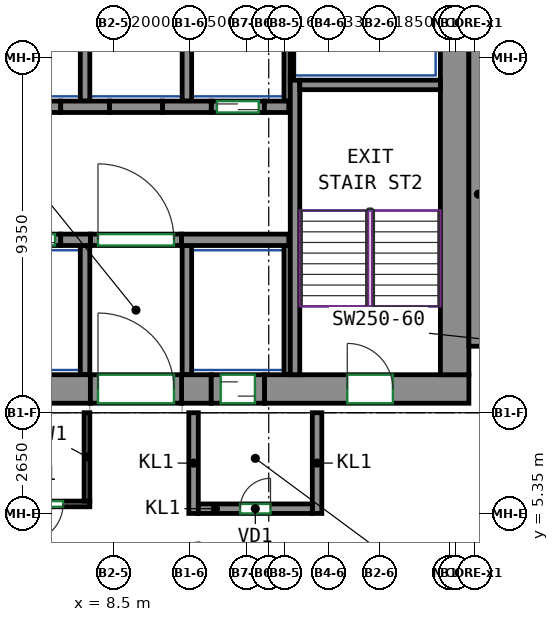
"""IFC4 building model, lengths in metres.
Left out: names, types, materials, properties, quantities, classifications, styles, units other than length and angle.
Written with IfcOpenShell. Run it as: python <this file> out.ifc"""

import sys

from ifc_helpers import new_model, si_unit, direction, frame, frame_2d, origin, place, context, subcontext, project, spatial, rectangle, extrude, source, transform, mapped, element, fill, save


model = new_model("IFC4")
c1 = context("Model", 3, precision=1e-05, world=origin(), true_north=direction((0.0, 1.0)))
c2 = subcontext(c1, "Body", "Model", "MODEL_VIEW")
j1 = project(units=[si_unit("LENGTHUNIT", "METRE"), si_unit("PLANEANGLEUNIT", "RADIAN")], contexts=[c1])
p1 = place(None, origin())
s1 = spatial("IfcSite", under=j1, at=p1, CompositionType="ELEMENT")
p2 = place(p1, origin())
s2 = spatial("IfcBuilding", under=s1, at=p2, CompositionType="ELEMENT")
p3 = place(p2, frame((0.0, 0.0, 210.1)))
s3 = spatial("IfcBuildingStorey", under=s2, at=p3, CompositionType="ELEMENT", Elevation=210.1)
m1 = source(origin(), c2, "Body", "SweptSolid", [
    extrude(rectangle(XDim=14.18, YDim=0.75, at=frame_2d((7.09, 0.0))), origin(), (0.0, 0.0, 1.0), 3.12),
])
p4 = place(p3, frame((-6.29, 8.625, 0.0), z_axis=(0.0, 0.0, 1.0), x_axis=(1.0, 0.0, 0.0)))
e1 = element("IfcWall", 1, at=p4, inside=s3, PredefinedType="SHEAR", context=c2, shape_type="MappedRepresentation", body=[
    mapped(m1, transform((0.0, 0.0, 0.0))),
])
m2 = source(origin(), c2, "Body", "SweptSolid", [
    extrude(rectangle(XDim=0.78, YDim=0.75, at=frame_2d((0.39, 0.0))), origin(), (0.0, 0.0, 1.0), 3.12),
])
p5 = place(p3, frame((10.29, 8.625, 0.0), z_axis=(0.0, 0.0, 1.0), x_axis=(1.0, 0.0, 0.0)))
e2 = element("IfcWall", 2, at=p5, inside=s3, PredefinedType="SHEAR", context=c2, shape_type="MappedRepresentation", body=[
    mapped(m2, transform((0.0, 0.0, 0.0))),
])
m3 = source(origin(), c2, "Body", "SweptSolid", [
    extrude(rectangle(XDim=5.38, YDim=0.75, at=frame_2d((2.69, 0.0))), origin(), (0.0, 0.0, 1.0), 3.12),
])
p6 = place(p3, frame((12.47, 8.625, 0.0), z_axis=(0.0, 0.0, 1.0), x_axis=(1.0, 0.0, 0.0)))
e3 = element("IfcWall", 3, at=p6, inside=s3, PredefinedType="SHEAR", context=c2, shape_type="MappedRepresentation", body=[
    mapped(m3, transform((0.0, 0.0, 0.0))),
])
p7 = place(p6, frame((2.18, 0.0, 0.0)))
e4 = element("IfcOpeningElement", 4, at=p7, cuts=e3, PredefinedType="OPENING", context=c2, shape_type="SweptSolid", body=[
    extrude(rectangle(XDim=1.2, YDim=2.1, at=frame_2d((0.6, 1.05))), frame((0.0, 0.385, 0.0), z_axis=(0.0, -1.0, 0.0), x_axis=(1.0, 0.0, 0.0)), (0.0, 0.0, 1.0), 0.77),
])
m4 = source(origin(), c2, "Body", "SweptSolid", [
    extrude(rectangle(XDim=12.0, YDim=0.75, at=frame_2d((6.0, 0.0))), origin(), (0.0, 0.0, 1.0), 3.12),
])
p8 = place(p3, frame((17.475, 9.0, 0.0), z_axis=(0.0, 0.0, 1.0), x_axis=(0.0, 1.0, 0.0)))
e5 = element("IfcWall", 5, at=p8, inside=s3, PredefinedType="SHEAR", context=c2, shape_type="MappedRepresentation", body=[
    mapped(m4, transform((0.0, 0.0, 0.0))),
])
m5 = source(origin(), c2, "Body", "SweptSolid", [
    extrude(rectangle(XDim=7.75, YDim=0.25, at=frame_2d((3.875, 0.0))), origin(), (0.0, 0.0, 1.0), 3.12),
])
p9 = place(p3, frame((13.275, 9.0, 0.0), z_axis=(0.0, 0.0, 1.0), x_axis=(0.0, 1.0, 0.0)))
e6 = element("IfcWall", 6, at=p9, inside=s3, PredefinedType="SHEAR", context=c2, shape_type="MappedRepresentation", body=[
    mapped(m5, transform((0.0, 0.0, 0.0))),
])
m6 = source(origin(), c2, "Body", "SweptSolid", [
    extrude(rectangle(XDim=3.7, YDim=0.25, at=frame_2d((1.85, 0.0))), origin(), (0.0, 0.0, 1.0), 3.12),
])
p10 = place(p3, frame((13.4, 16.625, 0.0), z_axis=(0.0, 0.0, 1.0), x_axis=(1.0, 0.0, 0.0)))
e7 = element("IfcWall", 7, at=p10, inside=s3, PredefinedType="SHEAR", context=c2, shape_type="MappedRepresentation", body=[
    mapped(m6, transform((0.0, 0.0, 0.0))),
])
m7 = source(origin(), c2, "Body", "SweptSolid", [
    extrude(rectangle(XDim=8.0, YDim=0.5, at=frame_2d((4.0, 0.0))), origin(), (0.0, 0.0, 1.0), 3.12),
])
p11 = place(p3, frame((18.1, 9.75, 0.0), z_axis=(0.0, 0.0, 1.0), x_axis=(0.0, 1.0, 0.0)))
e8 = element("IfcWall", 8, at=p11, inside=s3, PredefinedType="SHEAR", context=c2, shape_type="MappedRepresentation", body=[
    mapped(m7, transform((0.0, 0.0, 0.0))),
])
m8 = source(origin(), c2, "Body", "SweptSolid", [
    extrude(rectangle(XDim=0.78, YDim=0.3, at=frame_2d((0.39, 0.0))), origin(), (0.0, 0.0, 1.0), 3.12),
])
p12 = place(p3, frame((7.11, 12.55, 0.0), z_axis=(0.0, 0.0, 1.0), x_axis=(1.0, 0.0, 0.0)))
e9 = element("IfcWall", 9, at=p12, inside=s3, PredefinedType="SHEAR", context=c2, shape_type="MappedRepresentation", body=[
    mapped(m8, transform((0.0, 0.0, 0.0))),
])
m9 = source(origin(), c2, "Body", "SweptSolid", [
    extrude(rectangle(XDim=2.82, YDim=0.3, at=frame_2d((1.41, 0.0))), origin(), (0.0, 0.0, 1.0), 3.12),
])
p13 = place(p3, frame((10.29, 12.55, 0.0), z_axis=(0.0, 0.0, 1.0), x_axis=(1.0, 0.0, 0.0)))
e10 = element("IfcWall", 10, at=p13, inside=s3, PredefinedType="SHEAR", context=c2, shape_type="MappedRepresentation", body=[
    mapped(m9, transform((0.0, 0.0, 0.0))),
])
m10 = source(origin(), c2, "Body", "SweptSolid", [
    extrude(rectangle(XDim=1.28, YDim=0.3, at=frame_2d((0.64, 0.0))), origin(), (0.0, 0.0, 1.0), 3.12),
])
p14 = place(p3, frame((7.11, 16.05, 0.0), z_axis=(0.0, 0.0, 1.0), x_axis=(1.0, 0.0, 0.0)))
e11 = element("IfcWall", 11, at=p14, inside=s3, PredefinedType="SHEAR", context=c2, shape_type="MappedRepresentation", body=[
    mapped(m10, transform((0.0, 0.0, 0.0))),
])
m11 = source(origin(), c2, "Body", "SweptSolid", [
    extrude(rectangle(XDim=1.28, YDim=0.3, at=frame_2d((0.64, 0.0))), origin(), (0.0, 0.0, 1.0), 3.12),
])
p15 = place(p3, frame((9.79, 16.05, 0.0), z_axis=(0.0, 0.0, 1.0), x_axis=(1.0, 0.0, 0.0)))
e12 = element("IfcWall", 12, at=p15, inside=s3, PredefinedType="SHEAR", context=c2, shape_type="MappedRepresentation", body=[
    mapped(m11, transform((0.0, 0.0, 0.0))),
])
m12 = source(origin(), c2, "Body", "SweptSolid", [
    extrude(rectangle(XDim=0.64, YDim=0.3, at=frame_2d((0.32, 0.0))), origin(), (0.0, 0.0, 1.0), 3.12),
])
p16 = place(p3, frame((12.47, 16.05, 0.0), z_axis=(0.0, 0.0, 1.0), x_axis=(1.0, 0.0, 0.0)))
e13 = element("IfcWall", 13, at=p16, inside=s3, PredefinedType="SHEAR", context=c2, shape_type="MappedRepresentation", body=[
    mapped(m12, transform((0.0, 0.0, 0.0))),
])
m13 = source(origin(), c2, "Body", "SweptSolid", [
    extrude(rectangle(XDim=1.4, YDim=0.3, at=frame_2d((0.7, 0.0))), origin(), (0.0, 0.0, 1.0), 3.12),
])
p17 = place(p3, frame((5.71, 12.55, 0.0), z_axis=(0.0, 0.0, 1.0), x_axis=(1.0, 0.0, 0.0)))
e14 = element("IfcWall", 14, at=p17, inside=s3, PredefinedType="PARTITIONING", context=c2, shape_type="MappedRepresentation", body=[
    mapped(m13, transform((0.0, 0.0, 0.0))),
])
p18 = place(p17, frame((0.15, 0.0, 0.0)))
e15 = element("IfcOpeningElement", 15, at=p18, cuts=e14, PredefinedType="OPENING", context=c2, shape_type="SweptSolid", body=[
    extrude(rectangle(XDim=1.1, YDim=2.1, at=frame_2d((0.55, 1.05))), frame((0.0, 0.16, 0.0), z_axis=(0.0, -1.0, 0.0), x_axis=(1.0, 0.0, 0.0)), (0.0, 0.0, 1.0), 0.32),
])
m14 = source(origin(), c2, "Body", "SweptSolid", [
    extrude(rectangle(XDim=1.4, YDim=0.3, at=frame_2d((0.7, 0.0))), origin(), (0.0, 0.0, 1.0), 3.12),
])
p19 = place(p3, frame((11.07, 16.05, 0.0), z_axis=(0.0, 0.0, 1.0), x_axis=(1.0, 0.0, 0.0)))
e16 = element("IfcWall", 16, at=p19, inside=s3, PredefinedType="PARTITIONING", context=c2, shape_type="MappedRepresentation", body=[
    mapped(m14, transform((0.0, 0.0, 0.0))),
])
p20 = place(p19, frame((0.15, 0.0, 0.0)))
e17 = element("IfcOpeningElement", 17, at=p20, cuts=e16, PredefinedType="OPENING", context=c2, shape_type="SweptSolid", body=[
    extrude(rectangle(XDim=1.1, YDim=2.1, at=frame_2d((0.55, 1.05))), frame((0.0, 0.16, 0.0), z_axis=(0.0, -1.0, 0.0), x_axis=(1.0, 0.0, 0.0)), (0.0, 0.0, 1.0), 0.32),
])
m15 = source(origin(), c2, "Body", "SweptSolid", [
    extrude(rectangle(XDim=2.4, YDim=0.3, at=frame_2d((1.2, 0.0))), origin(), (0.0, 0.0, 1.0), 3.12),
])
p21 = place(p3, frame((7.89, 12.55, 0.0), z_axis=(0.0, 0.0, 1.0), x_axis=(1.0, 0.0, 0.0)))
e18 = element("IfcWall", 18, at=p21, inside=s3, PredefinedType="PARTITIONING", context=c2, shape_type="MappedRepresentation", body=[
    mapped(m15, transform((0.0, 0.0, 0.0))),
])
p22 = place(p21, frame((0.2, 0.0, 0.0)))
e19 = element("IfcOpeningElement", 19, at=p22, cuts=e18, PredefinedType="OPENING", context=c2, shape_type="SweptSolid", body=[
    extrude(rectangle(XDim=2.0, YDim=2.1, at=frame_2d((1.0, 1.05))), frame((0.0, 0.16, 0.0), z_axis=(0.0, -1.0, 0.0), x_axis=(1.0, 0.0, 0.0)), (0.0, 0.0, 1.0), 0.32),
])
for number, where, z_axis, x_axis in (
    (20, (5.71, 16.05, 0.0), (0.0, 0.0, 1.0), (1.0, 0.0, 0.0)),
    (21, (8.39, 16.05, 0.0), (0.0, 0.0, 1.0), (1.0, 0.0, 0.0)),
):
    element("IfcWall", number, at=place(p3, frame(where, z_axis=z_axis, x_axis=x_axis)), inside=s3, PredefinedType="PARTITIONING", context=c2, shape_type="MappedRepresentation", body=[
        mapped(m13, transform((0.0, 0.0, 0.0))),
    ])
m16 = source(origin(), c2, "Body", "SweptSolid", [
    extrude(rectangle(XDim=2.65, YDim=0.25, at=frame_2d((1.325, 0.0))), origin(), (0.0, 0.0, 1.0), 3.12),
])
for number, where, z_axis, x_axis in (
    (22, (10.605, 5.35, 0.0), (0.0, 0.0, 1.0), (0.0, 1.0, 0.0)),
    (23, (13.855, 5.35, 0.0), (0.0, 0.0, 1.0), (0.0, 1.0, 0.0)),
):
    element("IfcWall", number, at=place(p3, frame(where, z_axis=z_axis, x_axis=x_axis)), inside=s3, PredefinedType="PARTITIONING", context=c2, shape_type="MappedRepresentation", body=[
        mapped(m16, transform((0.0, 0.0, 0.0))),
    ])
m17 = source(origin(), c2, "Body", "SweptSolid", [
    extrude(rectangle(XDim=3.0, YDim=0.25, at=frame_2d((1.5, 0.0))), origin(), (0.0, 0.0, 1.0), 3.12),
])
p23 = place(p3, frame((10.73, 5.475, 0.0), z_axis=(0.0, 0.0, 1.0), x_axis=(1.0, 0.0, 0.0)))
e24 = element("IfcWall", 24, at=p23, inside=s3, PredefinedType="PARTITIONING", context=c2, shape_type="MappedRepresentation", body=[
    mapped(m17, transform((0.0, 0.0, 0.0))),
])
p24 = place(p23, frame((1.1, 0.0, 0.0)))
e25 = element("IfcOpeningElement", 25, at=p24, cuts=e24, PredefinedType="OPENING", context=c2, shape_type="SweptSolid", body=[
    extrude(rectangle(XDim=0.8, YDim=2.0, at=frame_2d((0.4, 1.0))), frame((0.0, 0.135, 0.0), z_axis=(0.0, -1.0, 0.0), x_axis=(1.0, 0.0, 0.0)), (0.0, 0.0, 1.0), 0.27),
])
m18 = source(origin(), c2, "Body", "SweptSolid", [
    extrude(rectangle(XDim=3.275, YDim=0.165, at=frame_2d((1.638, 0.0))), origin(), (0.0, 0.0, 1.0), 3.12),
])
p25 = place(p3, frame((13.067, 16.2, 0.0), z_axis=(0.0, 0.0, 1.0), x_axis=(0.0, 1.0, 0.0)))
e26 = element("IfcWall", 26, at=p25, inside=s3, PredefinedType="PARTITIONING", context=c2, shape_type="MappedRepresentation", body=[
    mapped(m18, transform((0.0, 0.0, 0.0))),
])
m19 = source(origin(), c2, "Body", "SweptSolid", [
    extrude(rectangle(XDim=3.275, YDim=0.25, at=frame_2d((1.638, 0.0))), origin(), (0.0, 0.0, 1.0), 3.12),
])
p26 = place(p3, frame((10.43, 16.2, 0.0), z_axis=(0.0, 0.0, 1.0), x_axis=(0.0, 1.0, 0.0)))
e27 = element("IfcWall", 27, at=p26, inside=s3, PredefinedType="PARTITIONING", context=c2, shape_type="MappedRepresentation", body=[
    mapped(m19, transform((0.0, 0.0, 0.0))),
])
m20 = source(origin(), c2, "Body", "SweptSolid", [
    extrude(rectangle(XDim=2.725, YDim=0.085, at=frame_2d((1.363, 0.0))), origin(), (0.0, 0.0, 1.0), 3.12),
])
p27 = place(p3, frame((13.192, 16.75, 0.0), z_axis=(0.0, 0.0, 1.0), x_axis=(0.0, 1.0, 0.0)))
e28 = element("IfcWall", 28, at=p27, inside=s3, PredefinedType="PARTITIONING", context=c2, shape_type="MappedRepresentation", body=[
    mapped(m20, transform((0.0, 0.0, 0.0))),
])
p28 = place(p3, frame((7.75, 16.2, 0.0), z_axis=(0.0, 0.0, 1.0), x_axis=(0.0, 1.0, 0.0)))
e29 = element("IfcWall", 29, at=p28, inside=s3, PredefinedType="PARTITIONING", context=c2, shape_type="MappedRepresentation", body=[
    mapped(m19, transform((0.0, 0.0, 0.0))),
])
m21 = source(origin(), c2, "Body", "SweptSolid", [
    extrude(rectangle(XDim=3.4, YDim=0.25, at=frame_2d((1.7, 0.0))), origin(), (0.0, 0.0, 1.0), 3.12),
])
p29 = place(p3, frame((10.43, 9.0, 0.0), z_axis=(0.0, 0.0, 1.0), x_axis=(0.0, 1.0, 0.0)))
e30 = element("IfcWall", 30, at=p29, inside=s3, PredefinedType="PARTITIONING", context=c2, shape_type="MappedRepresentation", body=[
    mapped(m21, transform((0.0, 0.0, 0.0))),
])
m22 = source(origin(), c2, "Body", "SweptSolid", [
    extrude(rectangle(XDim=3.4, YDim=0.165, at=frame_2d((1.7, 0.0))), origin(), (0.0, 0.0, 1.0), 3.12),
])
p30 = place(p3, frame((13.067, 9.0, 0.0), z_axis=(0.0, 0.0, 1.0), x_axis=(0.0, 1.0, 0.0)))
e31 = element("IfcWall", 31, at=p30, inside=s3, PredefinedType="PARTITIONING", context=c2, shape_type="MappedRepresentation", body=[
    mapped(m22, transform((0.0, 0.0, 0.0))),
])
p31 = place(p3, frame((7.75, 9.0, 0.0), z_axis=(0.0, 0.0, 1.0), x_axis=(0.0, 1.0, 0.0)))
e32 = element("IfcWall", 32, at=p31, inside=s3, PredefinedType="PARTITIONING", context=c2, shape_type="MappedRepresentation", body=[
    mapped(m21, transform((0.0, 0.0, 0.0))),
])
m23 = source(origin(), c2, "Body", "SweptSolid", [
    extrude(rectangle(XDim=2.4, YDim=0.75, at=frame_2d((1.2, 0.0))), origin(), (0.0, 0.0, 1.0), 2.7),
])
p32 = place(p3, frame((7.89, 8.625, 0.0), z_axis=(0.0, 0.0, 1.0), x_axis=(1.0, 0.0, 0.0)))
e33 = element("IfcWall", 33, at=p32, inside=s3, PredefinedType="PARTITIONING", context=c2, shape_type="MappedRepresentation", body=[
    mapped(m23, transform((0.0, 0.0, 0.0))),
])
p33 = place(p32, frame((0.2, 0.0, 0.0)))
e34 = element("IfcOpeningElement", 34, at=p33, cuts=e33, PredefinedType="OPENING", context=c2, shape_type="SweptSolid", body=[
    extrude(rectangle(XDim=2.0, YDim=2.1, at=frame_2d((1.0, 1.05))), frame((0.0, 0.385, 0.0), z_axis=(0.0, -1.0, 0.0), x_axis=(1.0, 0.0, 0.0)), (0.0, 0.0, 1.0), 0.77),
])
m24 = source(origin(), c2, "Body", "SweptSolid", [
    extrude(rectangle(XDim=1.4, YDim=0.75, at=frame_2d((0.7, 0.0))), origin(), (0.0, 0.0, 1.0), 2.7),
])
p34 = place(p3, frame((11.07, 8.625, 0.0), z_axis=(0.0, 0.0, 1.0), x_axis=(1.0, 0.0, 0.0)))
e35 = element("IfcWall", 35, at=p34, inside=s3, PredefinedType="PARTITIONING", context=c2, shape_type="MappedRepresentation", body=[
    mapped(m24, transform((0.0, 0.0, 0.0))),
])
p35 = place(p34, frame((0.25, 0.0, 0.0)))
e36 = element("IfcOpeningElement", 36, at=p35, cuts=e35, PredefinedType="OPENING", context=c2, shape_type="SweptSolid", body=[
    extrude(rectangle(XDim=0.9, YDim=2.1, at=frame_2d((0.45, 1.05))), frame((0.0, 0.385, 0.0), z_axis=(0.0, -1.0, 0.0), x_axis=(1.0, 0.0, 0.0)), (0.0, 0.0, 1.0), 0.77),
])
p36 = place(p3, frame((7.875, 5.6, 0.0), z_axis=(0.0, 0.0, 1.0), x_axis=(-1.0, 0.0, 0.0)))
e37 = element("IfcWall", 37, at=p36, inside=s3, PredefinedType="PARTITIONING", context=c2, shape_type="SweptSolid", body=[
    extrude(rectangle(XDim=13.275, YDim=0.15, at=frame_2d((6.637, 0.0))), origin(), (0.0, 0.0, 1.0), 3.12),
])
p37 = place(p36, frame((0.703, 0.0, 0.0)))
e38 = element("IfcOpeningElement", 38, at=p37, cuts=e37, PredefinedType="OPENING", context=c2, shape_type="SweptSolid", body=[
    extrude(rectangle(XDim=1.0, YDim=2.1, at=frame_2d((0.5, 1.05))), frame((0.0, 0.085, 0.0), z_axis=(0.0, -1.0, 0.0), x_axis=(1.0, 0.0, 0.0)), (0.0, 0.0, 1.0), 0.17),
])
p38 = place(p3, frame((7.8, 8.0, 0.0), z_axis=(0.0, 0.0, 1.0), x_axis=(0.0, -1.0, 0.0)))
e39 = element("IfcWall", 39, at=p38, inside=s3, PredefinedType="PARTITIONING", context=c2, shape_type="SweptSolid", body=[
    extrude(rectangle(XDim=2.325, YDim=0.15, at=frame_2d((1.163, 0.0))), origin(), (0.0, 0.0, 1.0), 3.12),
])
p39 = place(p22, origin())
e40 = element("IfcDoor", 40, at=p39, inside=s3, OperationType="DOUBLE_DOOR_SINGLE_SWING", PredefinedType="DOOR", context=c2, shape_type="SweptSolid", body=[
    extrude(rectangle(XDim=2.0, YDim=2.1, at=frame_2d((1.0, 1.05))), frame((0.0, 0.025, 0.0), z_axis=(0.0, -1.0, 0.0), x_axis=(1.0, 0.0, 0.0)), (0.0, 0.0, 1.0), 0.05),
])
fill(e19, e40)
p40 = place(p33, origin())
e41 = element("IfcDoor", 41, at=p40, inside=s3, OperationType="DOUBLE_DOOR_SINGLE_SWING", PredefinedType="DOOR", context=c2, shape_type="SweptSolid", body=[
    extrude(rectangle(XDim=2.0, YDim=2.1, at=frame_2d((1.0, 1.05))), frame((0.0, 0.28, 0.0), z_axis=(0.0, -1.0, 0.0), x_axis=(1.0, 0.0, 0.0)), (0.0, 0.0, 1.0), 0.05),
])
fill(e34, e41)
p41 = place(p24, origin())
e42 = element("IfcDoor", 42, at=p41, inside=s3, OperationType="SINGLE_SWING_RIGHT", PredefinedType="DOOR", context=c2, shape_type="SweptSolid", body=[
    extrude(rectangle(XDim=0.8, YDim=2.0, at=frame_2d((0.4, 1.0))), frame((0.0, 0.025, 0.0), z_axis=(0.0, -1.0, 0.0), x_axis=(1.0, 0.0, 0.0)), (0.0, 0.0, 1.0), 0.05),
])
fill(e25, e42)
p42 = place(p35, origin())
e43 = element("IfcDoor", 43, at=p42, inside=s3, OperationType="SLIDING_TO_LEFT", PredefinedType="DOOR", context=c2, shape_type="SweptSolid", body=[
    extrude(rectangle(XDim=0.9, YDim=2.1, at=frame_2d((0.45, 1.05))), frame((0.0, 0.28, 0.0), z_axis=(0.0, -1.0, 0.0), x_axis=(1.0, 0.0, 0.0)), (0.0, 0.0, 1.0), 0.05),
])
fill(e36, e43)
p43 = place(p18, origin())
e44 = element("IfcDoor", 44, at=p43, inside=s3, OperationType="DOUBLE_DOOR_SLIDING", PredefinedType="DOOR", context=c2, shape_type="SweptSolid", body=[
    extrude(rectangle(XDim=1.1, YDim=2.1, at=frame_2d((0.55, 1.05))), frame((0.0, 0.025, 0.0), z_axis=(0.0, -1.0, 0.0), x_axis=(1.0, 0.0, 0.0)), (0.0, 0.0, 1.0), 0.05),
])
fill(e15, e44)
p44 = place(p20, origin())
e45 = element("IfcDoor", 45, at=p44, inside=s3, OperationType="DOUBLE_DOOR_SLIDING", PredefinedType="DOOR", context=c2, shape_type="SweptSolid", body=[
    extrude(rectangle(XDim=1.1, YDim=2.1, at=frame_2d((0.55, 1.05))), frame((0.0, 0.025, 0.0), z_axis=(0.0, -1.0, 0.0), x_axis=(1.0, 0.0, 0.0)), (0.0, 0.0, 1.0), 0.05),
])
fill(e17, e45)
p45 = place(p7, origin())
e46 = element("IfcDoor", 46, at=p45, inside=s3, OperationType="DOUBLE_DOOR_SINGLE_SWING", PredefinedType="DOOR", context=c2, shape_type="SweptSolid", body=[
    extrude(rectangle(XDim=1.2, YDim=2.1, at=frame_2d((0.6, 1.05))), frame((0.0, 0.28, 0.0), z_axis=(0.0, -1.0, 0.0), x_axis=(1.0, 0.0, 0.0)), (0.0, 0.0, 1.0), 0.05),
])
fill(e4, e46)
p46 = place(p37, origin())
e47 = element("IfcDoor", 47, at=p46, inside=s3, OperationType="SINGLE_SWING_RIGHT", PredefinedType="DOOR", context=c2, shape_type="SweptSolid", body=[
    extrude(rectangle(XDim=1.0, YDim=2.1, at=frame_2d((0.5, 1.05))), frame((0.0, 0.025, 0.0), z_axis=(0.0, -1.0, 0.0), x_axis=(1.0, 0.0, 0.0)), (0.0, 0.0, 1.0), 0.05),
])
fill(e38, e47)
save(model, sys.argv[1])
